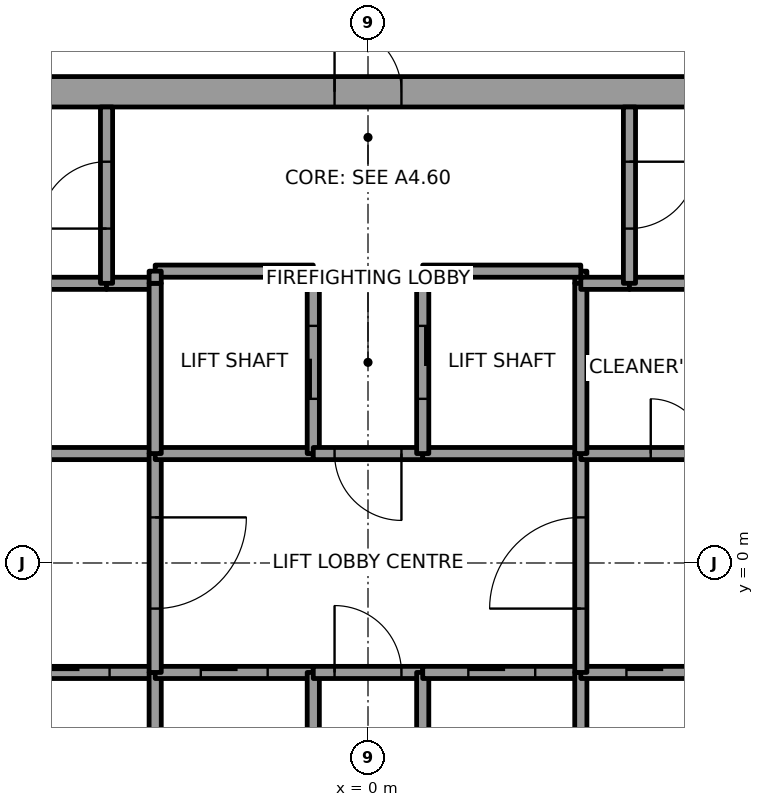
"""IFC4 building model, lengths in metres.
Left out: names, types, materials, properties, quantities, classifications, styles, units other than length and angle.
Written with IfcOpenShell. Run it as: python <this file> out.ifc"""

import sys

from ifc_helpers import new_model, si_unit, direction, frame, frame_2d, origin, place, context, subcontext, project, spatial, rectangle, extrude, element, fill, save


model = new_model("IFC4")
c1 = context("Model", 3, precision=1e-05, world=origin(), true_north=direction((0.0, 1.0)))
c2 = subcontext(c1, "Body", "Model", "MODEL_VIEW")
j1 = project(units=[si_unit("LENGTHUNIT", "METRE"), si_unit("PLANEANGLEUNIT", "RADIAN")], contexts=[c1])
p1 = place(None, origin())
s1 = spatial("IfcSite", under=j1, at=p1, CompositionType="ELEMENT")
p2 = place(p1, origin())
s2 = spatial("IfcBuilding", under=s1, at=p2, CompositionType="ELEMENT")
p3 = place(p2, frame((0.0, 0.0, 259.0)))
s3 = spatial("IfcBuildingStorey", under=s2, at=p3, CompositionType="ELEMENT", Elevation=259.0)
p4 = place(p3, frame((-11.0, 7.75, 0.0), z_axis=(0.0, 0.0, 1.0), x_axis=(1.0, 0.0, 0.0)))
e1 = element("IfcWall", 1, at=p4, inside=s3, PredefinedType="SHEAR", context=c2, shape_type="SweptSolid", body=[
    extrude(rectangle(XDim=22.0, YDim=0.5, at=frame_2d((11.0, 0.0))), origin(), (0.0, 0.0, 1.0), 4.0),
])
p5 = place(p4, frame((10.45, 0.0, 0.0)))
e2 = element("IfcOpeningElement", 2, at=p5, cuts=e1, PredefinedType="OPENING", context=c2, shape_type="SweptSolid", body=[
    extrude(rectangle(XDim=1.1, YDim=2.1, at=frame_2d((0.55, 1.05))), frame((0.0, 0.25, 0.0), z_axis=(0.0, -1.0, 0.0), x_axis=(1.0, 0.0, 0.0)), (0.0, 0.0, 1.0), 0.5),
])
p6 = place(p3, frame((-8.7, 1.8, 0.0), z_axis=(0.0, 0.0, 1.0), x_axis=(1.0, 0.0, 0.0)))
e3 = element("IfcWall", 3, at=p6, inside=s3, PredefinedType="SOLIDWALL", context=c2, shape_type="SweptSolid", body=[
    extrude(rectangle(XDim=5.2, YDim=0.2, at=frame_2d((2.6, 0.0))), origin(), (0.0, 0.0, 1.0), 3.85),
])
p7 = place(p6, frame((2.15, 0.0, 0.0)))
e4 = element("IfcOpeningElement", 4, at=p7, cuts=e3, PredefinedType="OPENING", context=c2, shape_type="SweptSolid", body=[
    extrude(rectangle(XDim=0.9, YDim=2.1, at=frame_2d((0.45, 1.05))), frame((0.0, 0.1, 0.0), z_axis=(0.0, -1.0, 0.0), x_axis=(1.0, 0.0, 0.0)), (0.0, 0.0, 1.0), 0.2),
])
p8 = place(p3, frame((-4.3, 4.6, 0.0), z_axis=(0.0, 0.0, 1.0), x_axis=(-1.0, 0.0, 0.0)))
e5 = element("IfcWall", 5, at=p8, inside=s3, PredefinedType="SOLIDWALL", context=c2, shape_type="SweptSolid", body=[
    extrude(rectangle(XDim=4.4, YDim=0.2, at=frame_2d((2.2, 0.0))), origin(), (0.0, 0.0, 1.0), 3.85),
])
p9 = place(p3, frame((-6.1, -1.8, 0.0), z_axis=(0.0, 0.0, 1.0), x_axis=(1.0, 0.0, 0.0)))
e6 = element("IfcWall", 6, at=p9, inside=s3, PredefinedType="SOLIDWALL", context=c2, shape_type="SweptSolid", body=[
    extrude(rectangle(XDim=2.6, YDim=0.2, at=frame_2d((1.3, 0.0))), origin(), (0.0, 0.0, 1.0), 3.85),
])
p10 = place(p9, frame((0.75, 0.0, 0.0)))
e7 = element("IfcOpeningElement", 7, at=p10, cuts=e6, PredefinedType="OPENING", context=c2, shape_type="SweptSolid", body=[
    extrude(rectangle(XDim=1.1, YDim=2.1, at=frame_2d((0.55, 1.05))), frame((0.0, 0.1, 0.0), z_axis=(0.0, -1.0, 0.0), x_axis=(1.0, 0.0, 0.0)), (0.0, 0.0, 1.0), 0.2),
])
p11 = place(p3, frame((-3.5, 4.6, 0.0), z_axis=(0.0, 0.0, 1.0), x_axis=(-1.0, 0.0, 0.0)))
e8 = element("IfcWall", 8, at=p11, inside=s3, PredefinedType="SOLIDWALL", context=c2, shape_type="SweptSolid", body=[
    extrude(rectangle(XDim=0.8, YDim=0.2, at=frame_2d((0.4, 0.0))), origin(), (0.0, 0.0, 1.0), 3.85),
])
p12 = place(p3, frame((-4.3, 4.6, 0.0), z_axis=(0.0, 0.0, 1.0), x_axis=(0.0, 1.0, 0.0)))
e9 = element("IfcWall", 9, at=p12, inside=s3, PredefinedType="SOLIDWALL", context=c2, shape_type="SweptSolid", body=[
    extrude(rectangle(XDim=2.9, YDim=0.2, at=frame_2d((1.45, 0.0))), origin(), (0.0, 0.0, 1.0), 3.85),
])
p13 = place(p12, frame((0.9, 0.0, 0.0)))
e10 = element("IfcOpeningElement", 10, at=p13, cuts=e9, PredefinedType="OPENING", context=c2, shape_type="SweptSolid", body=[
    extrude(rectangle(XDim=1.1, YDim=2.1, at=frame_2d((0.55, 1.05))), frame((0.0, 0.1, 0.0), z_axis=(0.0, -1.0, 0.0), x_axis=(1.0, 0.0, 0.0)), (0.0, 0.0, 1.0), 0.2),
])
p14 = place(p3, frame((-3.5, -4.6, 0.0), z_axis=(0.0, 0.0, 1.0), x_axis=(0.0, 1.0, 0.0)))
e11 = element("IfcWall", 11, at=p14, inside=s3, PredefinedType="SOLIDWALL", context=c2, shape_type="SweptSolid", body=[
    extrude(rectangle(XDim=2.8, YDim=0.2, at=frame_2d((1.4, 0.0))), origin(), (0.0, 0.0, 1.0), 3.85),
])
p15 = place(p3, frame((-3.5, -1.8, 0.0), z_axis=(0.0, 0.0, 1.0), x_axis=(1.0, 0.0, 0.0)))
e12 = element("IfcWall", 12, at=p15, inside=s3, PredefinedType="SOLIDWALL", context=c2, shape_type="SweptSolid", body=[
    extrude(rectangle(XDim=2.6, YDim=0.2, at=frame_2d((1.3, 0.0))), origin(), (0.0, 0.0, 1.0), 3.85),
])
p16 = place(p15, frame((0.75, 0.0, 0.0)))
e13 = element("IfcOpeningElement", 13, at=p16, cuts=e12, PredefinedType="OPENING", context=c2, shape_type="SweptSolid", body=[
    extrude(rectangle(XDim=1.1, YDim=2.1, at=frame_2d((0.55, 1.05))), frame((0.0, 0.1, 0.0), z_axis=(0.0, -1.0, 0.0), x_axis=(1.0, 0.0, 0.0)), (0.0, 0.0, 1.0), 0.2),
])
p17 = place(p3, frame((-3.5, 1.8, 0.0), z_axis=(0.0, 0.0, 1.0), x_axis=(0.0, -1.0, 0.0)))
e14 = element("IfcWall", 14, at=p17, inside=s3, PredefinedType="SOLIDWALL", context=c2, shape_type="SweptSolid", body=[
    extrude(rectangle(XDim=3.6, YDim=0.2, at=frame_2d((1.8, 0.0))), origin(), (0.0, 0.0, 1.0), 3.85),
])
p18 = place(p17, frame((1.05, 0.0, 0.0)))
e15 = element("IfcOpeningElement", 15, at=p18, cuts=e14, PredefinedType="OPENING", context=c2, shape_type="SweptSolid", body=[
    extrude(rectangle(XDim=1.5, YDim=2.1, at=frame_2d((0.75, 1.05))), frame((0.0, 0.1, 0.0), z_axis=(0.0, -1.0, 0.0), x_axis=(1.0, 0.0, 0.0)), (0.0, 0.0, 1.0), 0.2),
])
p19 = place(p3, frame((-0.9, 1.8, 0.0), z_axis=(0.0, 0.0, 1.0), x_axis=(-1.0, 0.0, 0.0)))
e16 = element("IfcWall", 16, at=p19, inside=s3, PredefinedType="SOLIDWALL", context=c2, shape_type="SweptSolid", body=[
    extrude(rectangle(XDim=2.6, YDim=0.2, at=frame_2d((1.3, 0.0))), origin(), (0.0, 0.0, 1.0), 3.85),
])
p20 = place(p3, frame((-3.5, 1.8, 0.0), z_axis=(0.0, 0.0, 1.0), x_axis=(0.0, 1.0, 0.0)))
e17 = element("IfcWall", 17, at=p20, inside=s3, PredefinedType="SOLIDWALL", context=c2, shape_type="SweptSolid", body=[
    extrude(rectangle(XDim=2.8, YDim=0.2, at=frame_2d((1.4, 0.0))), origin(), (0.0, 0.0, 1.0), 3.85),
])
p21 = place(p3, frame((-0.9, 1.8, 0.0), z_axis=(0.0, 0.0, 1.0), x_axis=(0.0, 1.0, 0.0)))
e18 = element("IfcWall", 18, at=p21, inside=s3, PredefinedType="SOLIDWALL", context=c2, shape_type="SweptSolid", body=[
    extrude(rectangle(XDim=3.0, YDim=0.2, at=frame_2d((1.5, 0.0))), origin(), (0.0, 0.0, 1.0), 3.85),
])
p22 = place(p21, frame((0.9, 0.0, 0.0)))
e19 = element("IfcOpeningElement", 19, at=p22, cuts=e18, PredefinedType="OPENING", context=c2, shape_type="SweptSolid", body=[
    extrude(rectangle(XDim=1.2, YDim=2.1, at=frame_2d((0.6, 1.05))), frame((0.0, 0.1, 0.0), z_axis=(0.0, -1.0, 0.0), x_axis=(1.0, 0.0, 0.0)), (0.0, 0.0, 1.0), 0.2),
])
p23 = place(p3, frame((-0.9, 4.8, 0.0), z_axis=(0.0, 0.0, 1.0), x_axis=(-1.0, 0.0, 0.0)))
e20 = element("IfcWall", 20, at=p23, inside=s3, PredefinedType="SOLIDWALL", context=c2, shape_type="SweptSolid", body=[
    extrude(rectangle(XDim=2.6, YDim=0.2, at=frame_2d((1.3, 0.0))), origin(), (0.0, 0.0, 1.0), 3.85),
])
p24 = place(p3, frame((-3.5, 4.8, 0.0), z_axis=(0.0, 0.0, 1.0), x_axis=(0.0, -1.0, 0.0)))
e21 = element("IfcWall", 21, at=p24, inside=s3, PredefinedType="SOLIDWALL", context=c2, shape_type="SweptSolid", body=[
    extrude(rectangle(XDim=0.2, YDim=0.2, at=frame_2d((0.1, 0.0))), origin(), (0.0, 0.0, 1.0), 3.85),
])
p25 = place(p3, frame((-0.9, -4.6, 0.0), z_axis=(0.0, 0.0, 1.0), x_axis=(0.0, 1.0, 0.0)))
e22 = element("IfcWall", 22, at=p25, inside=s3, PredefinedType="SOLIDWALL", context=c2, shape_type="SweptSolid", body=[
    extrude(rectangle(XDim=2.8, YDim=0.2, at=frame_2d((1.4, 0.0))), origin(), (0.0, 0.0, 1.0), 3.85),
])
p26 = place(p3, frame((-0.9, -1.8, 0.0), z_axis=(0.0, 0.0, 1.0), x_axis=(1.0, 0.0, 0.0)))
e23 = element("IfcWall", 23, at=p26, inside=s3, PredefinedType="SOLIDWALL", context=c2, shape_type="SweptSolid", body=[
    extrude(rectangle(XDim=1.8, YDim=0.2, at=frame_2d((0.9, 0.0))), origin(), (0.0, 0.0, 1.0), 3.85),
])
p27 = place(p26, frame((0.35, 0.0, 0.0)))
e24 = element("IfcOpeningElement", 24, at=p27, cuts=e23, PredefinedType="OPENING", context=c2, shape_type="SweptSolid", body=[
    extrude(rectangle(XDim=1.1, YDim=2.1, at=frame_2d((0.55, 1.05))), frame((0.0, 0.1, 0.0), z_axis=(0.0, -1.0, 0.0), x_axis=(1.0, 0.0, 0.0)), (0.0, 0.0, 1.0), 0.2),
])
p28 = place(p3, frame((0.9, 1.8, 0.0), z_axis=(0.0, 0.0, 1.0), x_axis=(-1.0, 0.0, 0.0)))
e25 = element("IfcWall", 25, at=p28, inside=s3, PredefinedType="SOLIDWALL", context=c2, shape_type="SweptSolid", body=[
    extrude(rectangle(XDim=1.8, YDim=0.2, at=frame_2d((0.9, 0.0))), origin(), (0.0, 0.0, 1.0), 3.85),
])
p29 = place(p28, frame((0.35, 0.0, 0.0)))
e26 = element("IfcOpeningElement", 26, at=p29, cuts=e25, PredefinedType="OPENING", context=c2, shape_type="SweptSolid", body=[
    extrude(rectangle(XDim=1.1, YDim=2.1, at=frame_2d((0.55, 1.05))), frame((0.0, 0.1, 0.0), z_axis=(0.0, -1.0, 0.0), x_axis=(1.0, 0.0, 0.0)), (0.0, 0.0, 1.0), 0.2),
])
p30 = place(p3, frame((0.9, -1.8, 0.0), z_axis=(0.0, 0.0, 1.0), x_axis=(0.0, -1.0, 0.0)))
e27 = element("IfcWall", 27, at=p30, inside=s3, PredefinedType="SOLIDWALL", context=c2, shape_type="SweptSolid", body=[
    extrude(rectangle(XDim=2.8, YDim=0.2, at=frame_2d((1.4, 0.0))), origin(), (0.0, 0.0, 1.0), 3.85),
])
p31 = place(p3, frame((0.9, -1.8, 0.0), z_axis=(0.0, 0.0, 1.0), x_axis=(1.0, 0.0, 0.0)))
e28 = element("IfcWall", 28, at=p31, inside=s3, PredefinedType="SOLIDWALL", context=c2, shape_type="SweptSolid", body=[
    extrude(rectangle(XDim=2.6, YDim=0.2, at=frame_2d((1.3, 0.0))), origin(), (0.0, 0.0, 1.0), 3.85),
])
p32 = place(p31, frame((0.75, 0.0, 0.0)))
e29 = element("IfcOpeningElement", 29, at=p32, cuts=e28, PredefinedType="OPENING", context=c2, shape_type="SweptSolid", body=[
    extrude(rectangle(XDim=1.1, YDim=2.1, at=frame_2d((0.55, 1.05))), frame((0.0, 0.1, 0.0), z_axis=(0.0, -1.0, 0.0), x_axis=(1.0, 0.0, 0.0)), (0.0, 0.0, 1.0), 0.2),
])
p33 = place(p3, frame((3.5, 1.8, 0.0), z_axis=(0.0, 0.0, 1.0), x_axis=(-1.0, 0.0, 0.0)))
e30 = element("IfcWall", 30, at=p33, inside=s3, PredefinedType="SOLIDWALL", context=c2, shape_type="SweptSolid", body=[
    extrude(rectangle(XDim=2.6, YDim=0.2, at=frame_2d((1.3, 0.0))), origin(), (0.0, 0.0, 1.0), 3.85),
])
p34 = place(p3, frame((3.5, 4.6, 0.0), z_axis=(0.0, 0.0, 1.0), x_axis=(0.0, 1.0, 0.0)))
e31 = element("IfcWall", 31, at=p34, inside=s3, PredefinedType="SOLIDWALL", context=c2, shape_type="SweptSolid", body=[
    extrude(rectangle(XDim=0.2, YDim=0.2, at=frame_2d((0.1, 0.0))), origin(), (0.0, 0.0, 1.0), 3.85),
])
p35 = place(p3, frame((3.5, 4.8, 0.0), z_axis=(0.0, 0.0, 1.0), x_axis=(-1.0, 0.0, 0.0)))
e32 = element("IfcWall", 32, at=p35, inside=s3, PredefinedType="SOLIDWALL", context=c2, shape_type="SweptSolid", body=[
    extrude(rectangle(XDim=2.6, YDim=0.2, at=frame_2d((1.3, 0.0))), origin(), (0.0, 0.0, 1.0), 3.85),
])
p36 = place(p3, frame((0.9, 4.8, 0.0), z_axis=(0.0, 0.0, 1.0), x_axis=(0.0, -1.0, 0.0)))
e33 = element("IfcWall", 33, at=p36, inside=s3, PredefinedType="SOLIDWALL", context=c2, shape_type="SweptSolid", body=[
    extrude(rectangle(XDim=3.0, YDim=0.2, at=frame_2d((1.5, 0.0))), origin(), (0.0, 0.0, 1.0), 3.85),
])
p37 = place(p36, frame((0.9, 0.0, 0.0)))
e34 = element("IfcOpeningElement", 34, at=p37, cuts=e33, PredefinedType="OPENING", context=c2, shape_type="SweptSolid", body=[
    extrude(rectangle(XDim=1.2, YDim=2.1, at=frame_2d((0.6, 1.05))), frame((0.0, 0.1, 0.0), z_axis=(0.0, -1.0, 0.0), x_axis=(1.0, 0.0, 0.0)), (0.0, 0.0, 1.0), 0.2),
])
p38 = place(p3, frame((3.5, -4.6, 0.0), z_axis=(0.0, 0.0, 1.0), x_axis=(0.0, 1.0, 0.0)))
e35 = element("IfcWall", 35, at=p38, inside=s3, PredefinedType="SOLIDWALL", context=c2, shape_type="SweptSolid", body=[
    extrude(rectangle(XDim=2.8, YDim=0.2, at=frame_2d((1.4, 0.0))), origin(), (0.0, 0.0, 1.0), 3.85),
])
p39 = place(p3, frame((3.5, -1.8, 0.0), z_axis=(0.0, 0.0, 1.0), x_axis=(1.0, 0.0, 0.0)))
e36 = element("IfcWall", 36, at=p39, inside=s3, PredefinedType="SOLIDWALL", context=c2, shape_type="SweptSolid", body=[
    extrude(rectangle(XDim=2.6, YDim=0.2, at=frame_2d((1.3, 0.0))), origin(), (0.0, 0.0, 1.0), 3.85),
])
p40 = place(p39, frame((0.75, 0.0, 0.0)))
e37 = element("IfcOpeningElement", 37, at=p40, cuts=e36, PredefinedType="OPENING", context=c2, shape_type="SweptSolid", body=[
    extrude(rectangle(XDim=1.1, YDim=2.1, at=frame_2d((0.55, 1.05))), frame((0.0, 0.1, 0.0), z_axis=(0.0, -1.0, 0.0), x_axis=(1.0, 0.0, 0.0)), (0.0, 0.0, 1.0), 0.2),
])
p41 = place(p3, frame((3.5, -1.8, 0.0), z_axis=(0.0, 0.0, 1.0), x_axis=(0.0, 1.0, 0.0)))
e38 = element("IfcWall", 38, at=p41, inside=s3, PredefinedType="SOLIDWALL", context=c2, shape_type="SweptSolid", body=[
    extrude(rectangle(XDim=3.6, YDim=0.2, at=frame_2d((1.8, 0.0))), origin(), (0.0, 0.0, 1.0), 3.85),
])
p42 = place(p41, frame((1.05, 0.0, 0.0)))
e39 = element("IfcOpeningElement", 39, at=p42, cuts=e38, PredefinedType="OPENING", context=c2, shape_type="SweptSolid", body=[
    extrude(rectangle(XDim=1.5, YDim=2.1, at=frame_2d((0.75, 1.05))), frame((0.0, 0.1, 0.0), z_axis=(0.0, -1.0, 0.0), x_axis=(1.0, 0.0, 0.0)), (0.0, 0.0, 1.0), 0.2),
])
p43 = place(p3, frame((3.5, 1.8, 0.0), z_axis=(0.0, 0.0, 1.0), x_axis=(1.0, 0.0, 0.0)))
e40 = element("IfcWall", 40, at=p43, inside=s3, PredefinedType="SOLIDWALL", context=c2, shape_type="SweptSolid", body=[
    extrude(rectangle(XDim=3.2, YDim=0.2, at=frame_2d((1.6, 0.0))), origin(), (0.0, 0.0, 1.0), 3.85),
])
p44 = place(p43, frame((1.15, 0.0, 0.0)))
e41 = element("IfcOpeningElement", 41, at=p44, cuts=e40, PredefinedType="OPENING", context=c2, shape_type="SweptSolid", body=[
    extrude(rectangle(XDim=0.9, YDim=2.1, at=frame_2d((0.45, 1.05))), frame((0.0, 0.1, 0.0), z_axis=(0.0, -1.0, 0.0), x_axis=(1.0, 0.0, 0.0)), (0.0, 0.0, 1.0), 0.2),
])
p45 = place(p3, frame((3.5, 4.6, 0.0), z_axis=(0.0, 0.0, 1.0), x_axis=(0.0, -1.0, 0.0)))
e42 = element("IfcWall", 42, at=p45, inside=s3, PredefinedType="SOLIDWALL", context=c2, shape_type="SweptSolid", body=[
    extrude(rectangle(XDim=2.8, YDim=0.2, at=frame_2d((1.4, 0.0))), origin(), (0.0, 0.0, 1.0), 3.85),
])
p46 = place(p3, frame((4.3, 4.6, 0.0), z_axis=(0.0, 0.0, 1.0), x_axis=(-1.0, 0.0, 0.0)))
e43 = element("IfcWall", 43, at=p46, inside=s3, PredefinedType="SOLIDWALL", context=c2, shape_type="SweptSolid", body=[
    extrude(rectangle(XDim=0.8, YDim=0.2, at=frame_2d((0.4, 0.0))), origin(), (0.0, 0.0, 1.0), 3.85),
])
p47 = place(p3, frame((6.7, 4.6, 0.0), z_axis=(0.0, 0.0, 1.0), x_axis=(-1.0, 0.0, 0.0)))
e44 = element("IfcWall", 44, at=p47, inside=s3, PredefinedType="SOLIDWALL", context=c2, shape_type="SweptSolid", body=[
    extrude(rectangle(XDim=2.4, YDim=0.2, at=frame_2d((1.2, 0.0))), origin(), (0.0, 0.0, 1.0), 3.85),
])
p48 = place(p3, frame((4.3, 7.5, 0.0), z_axis=(0.0, 0.0, 1.0), x_axis=(0.0, -1.0, 0.0)))
e45 = element("IfcWall", 45, at=p48, inside=s3, PredefinedType="SOLIDWALL", context=c2, shape_type="SweptSolid", body=[
    extrude(rectangle(XDim=2.9, YDim=0.2, at=frame_2d((1.45, 0.0))), origin(), (0.0, 0.0, 1.0), 3.85),
])
p49 = place(p48, frame((0.9, 0.0, 0.0)))
e46 = element("IfcOpeningElement", 46, at=p49, cuts=e45, PredefinedType="OPENING", context=c2, shape_type="SweptSolid", body=[
    extrude(rectangle(XDim=1.1, YDim=2.1, at=frame_2d((0.55, 1.05))), frame((0.0, 0.1, 0.0), z_axis=(0.0, -1.0, 0.0), x_axis=(1.0, 0.0, 0.0)), (0.0, 0.0, 1.0), 0.2),
])
p50 = place(p10, origin())
e47 = element("IfcDoor", 47, at=p50, inside=s3, OperationType="SLIDING_TO_LEFT", PredefinedType="DOOR", context=c2, shape_type="SweptSolid", body=[
    extrude(rectangle(XDim=1.1, YDim=2.1, at=frame_2d((0.55, 1.05))), frame((0.0, 0.025, 0.0), z_axis=(0.0, -1.0, 0.0), x_axis=(1.0, 0.0, 0.0)), (0.0, 0.0, 1.0), 0.05),
])
fill(e7, e47)
p51 = place(p16, origin())
e48 = element("IfcDoor", 48, at=p51, inside=s3, OperationType="SLIDING_TO_RIGHT", PredefinedType="DOOR", context=c2, shape_type="SweptSolid", body=[
    extrude(rectangle(XDim=1.1, YDim=2.1, at=frame_2d((0.55, 1.05))), frame((0.0, 0.025, 0.0), z_axis=(0.0, -1.0, 0.0), x_axis=(1.0, 0.0, 0.0)), (0.0, 0.0, 1.0), 0.05),
])
fill(e13, e48)
p52 = place(p32, origin())
e49 = element("IfcDoor", 49, at=p52, inside=s3, OperationType="SLIDING_TO_RIGHT", PredefinedType="DOOR", context=c2, shape_type="SweptSolid", body=[
    extrude(rectangle(XDim=1.1, YDim=2.1, at=frame_2d((0.55, 1.05))), frame((0.0, 0.025, 0.0), z_axis=(0.0, -1.0, 0.0), x_axis=(1.0, 0.0, 0.0)), (0.0, 0.0, 1.0), 0.05),
])
fill(e29, e49)
p53 = place(p40, origin())
e50 = element("IfcDoor", 50, at=p53, inside=s3, OperationType="SLIDING_TO_LEFT", PredefinedType="DOOR", context=c2, shape_type="SweptSolid", body=[
    extrude(rectangle(XDim=1.1, YDim=2.1, at=frame_2d((0.55, 1.05))), frame((0.0, 0.025, 0.0), z_axis=(0.0, -1.0, 0.0), x_axis=(1.0, 0.0, 0.0)), (0.0, 0.0, 1.0), 0.05),
])
fill(e37, e50)
p54 = place(p22, origin())
e51 = element("IfcDoor", 51, at=p54, inside=s3, OperationType="SLIDING_TO_RIGHT", PredefinedType="DOOR", context=c2, shape_type="SweptSolid", body=[
    extrude(rectangle(XDim=1.2, YDim=2.1, at=frame_2d((0.6, 1.05))), frame((0.0, 0.025, 0.0), z_axis=(0.0, -1.0, 0.0), x_axis=(1.0, 0.0, 0.0)), (0.0, 0.0, 1.0), 0.05),
])
fill(e19, e51)
p55 = place(p37, origin())
e52 = element("IfcDoor", 52, at=p55, inside=s3, OperationType="SLIDING_TO_LEFT", PredefinedType="DOOR", context=c2, shape_type="SweptSolid", body=[
    extrude(rectangle(XDim=1.2, YDim=2.1, at=frame_2d((0.6, 1.05))), frame((0.0, 0.025, 0.0), z_axis=(0.0, -1.0, 0.0), x_axis=(1.0, 0.0, 0.0)), (0.0, 0.0, 1.0), 0.05),
])
fill(e34, e52)
p56 = place(p18, origin())
e53 = element("IfcDoor", 53, at=p56, inside=s3, OperationType="DOUBLE_DOOR_SINGLE_SWING", PredefinedType="DOOR", context=c2, shape_type="SweptSolid", body=[
    extrude(rectangle(XDim=1.5, YDim=2.1, at=frame_2d((0.75, 1.05))), frame((0.0, 0.025, 0.0), z_axis=(0.0, -1.0, 0.0), x_axis=(1.0, 0.0, 0.0)), (0.0, 0.0, 1.0), 0.05),
])
fill(e15, e53)
p57 = place(p42, origin())
e54 = element("IfcDoor", 54, at=p57, inside=s3, OperationType="DOUBLE_DOOR_SINGLE_SWING", PredefinedType="DOOR", context=c2, shape_type="SweptSolid", body=[
    extrude(rectangle(XDim=1.5, YDim=2.1, at=frame_2d((0.75, 1.05))), frame((0.0, 0.025, 0.0), z_axis=(0.0, -1.0, 0.0), x_axis=(1.0, 0.0, 0.0)), (0.0, 0.0, 1.0), 0.05),
])
fill(e39, e54)
p58 = place(p29, origin())
e55 = element("IfcDoor", 55, at=p58, inside=s3, OperationType="SINGLE_SWING_LEFT", PredefinedType="DOOR", context=c2, shape_type="SweptSolid", body=[
    extrude(rectangle(XDim=1.1, YDim=2.1, at=frame_2d((0.55, 1.05))), frame((0.0, 0.025, 0.0), z_axis=(0.0, -1.0, 0.0), x_axis=(1.0, 0.0, 0.0)), (0.0, 0.0, 1.0), 0.05),
])
fill(e26, e55)
p59 = place(p27, origin())
e56 = element("IfcDoor", 56, at=p59, inside=s3, OperationType="SINGLE_SWING_RIGHT", PredefinedType="DOOR", context=c2, shape_type="SweptSolid", body=[
    extrude(rectangle(XDim=1.1, YDim=2.1, at=frame_2d((0.55, 1.05))), frame((0.0, 0.025, 0.0), z_axis=(0.0, -1.0, 0.0), x_axis=(1.0, 0.0, 0.0)), (0.0, 0.0, 1.0), 0.05),
])
fill(e24, e56)
p60 = place(p13, origin())
e57 = element("IfcDoor", 57, at=p60, inside=s3, OperationType="SINGLE_SWING_LEFT", PredefinedType="DOOR", context=c2, shape_type="SweptSolid", body=[
    extrude(rectangle(XDim=1.1, YDim=2.1, at=frame_2d((0.55, 1.05))), frame((0.0, 0.025, 0.0), z_axis=(0.0, -1.0, 0.0), x_axis=(1.0, 0.0, 0.0)), (0.0, 0.0, 1.0), 0.05),
])
fill(e10, e57)
p61 = place(p49, origin())
e58 = element("IfcDoor", 58, at=p61, inside=s3, OperationType="SINGLE_SWING_RIGHT", PredefinedType="DOOR", context=c2, shape_type="SweptSolid", body=[
    extrude(rectangle(XDim=1.1, YDim=2.1, at=frame_2d((0.55, 1.05))), frame((0.0, 0.025, 0.0), z_axis=(0.0, -1.0, 0.0), x_axis=(1.0, 0.0, 0.0)), (0.0, 0.0, 1.0), 0.05),
])
fill(e46, e58)
p62 = place(p44, origin())
e59 = element("IfcDoor", 59, at=p62, inside=s3, OperationType="SINGLE_SWING_RIGHT", PredefinedType="DOOR", context=c2, shape_type="SweptSolid", body=[
    extrude(rectangle(XDim=0.9, YDim=2.1, at=frame_2d((0.45, 1.05))), frame((0.0, 0.025, 0.0), z_axis=(0.0, -1.0, 0.0), x_axis=(1.0, 0.0, 0.0)), (0.0, 0.0, 1.0), 0.05),
])
fill(e41, e59)
p63 = place(p5, origin())
e60 = element("IfcDoor", 60, at=p63, inside=s3, OperationType="SINGLE_SWING_RIGHT", PredefinedType="DOOR", context=c2, shape_type="SweptSolid", body=[
    extrude(rectangle(XDim=1.1, YDim=2.1, at=frame_2d((0.55, 1.05))), frame((0.0, 0.025, 0.0), z_axis=(0.0, -1.0, 0.0), x_axis=(1.0, 0.0, 0.0)), (0.0, 0.0, 1.0), 0.05),
])
fill(e2, e60)
save(model, sys.argv[1])
